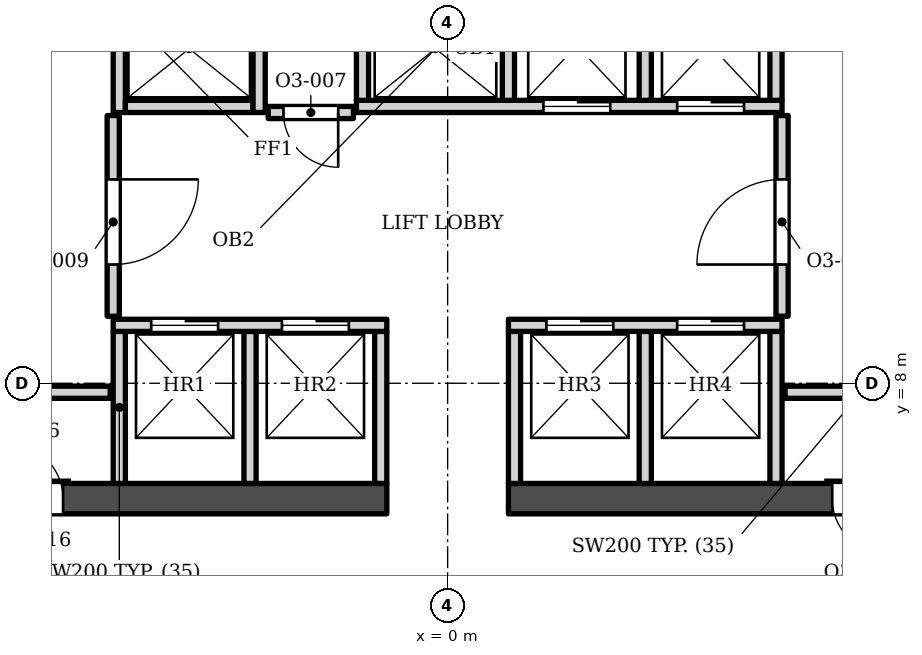
"""IFC4 building model, lengths in metres.
Left out: names, types, materials, properties, quantities, classifications, styles, units other than length and angle.
Written with IfcOpenShell. Run it as: python <this file> out.ifc"""

import sys

from ifc_helpers import new_model, si_unit, direction, frame, frame_2d, origin, place, context, subcontext, project, spatial, rectangle, extrude, element, fill, save


model = new_model("IFC4")
c1 = context("Model", 3, precision=1e-05, world=origin(), true_north=direction((0.0, 1.0)))
c2 = subcontext(c1, "Body", "Model", "MODEL_VIEW")
j1 = project(units=[si_unit("LENGTHUNIT", "METRE"), si_unit("PLANEANGLEUNIT", "RADIAN")], contexts=[c1])
p1 = place(None, origin())
s1 = spatial("IfcSite", under=j1, at=p1, CompositionType="ELEMENT")
p2 = place(p1, origin())
s2 = spatial("IfcBuilding", under=s1, at=p2, CompositionType="ELEMENT")
p3 = place(p2, frame((0.0, 0.0, 168.0)))
s3 = spatial("IfcBuildingStorey", under=s2, at=p3, CompositionType="ELEMENT", Elevation=168.0)
p4 = place(p3, frame((-8.05, 6.103, 0.0), z_axis=(0.0, 0.0, 1.0), x_axis=(1.0, 0.0, 0.0)))
e1 = element("IfcWall", 1, at=p4, inside=s3, PredefinedType="SHEAR", context=c2, shape_type="SweptSolid", body=[
    extrude(rectangle(XDim=7.05, YDim=0.5, at=frame_2d((3.525, 0.0))), origin(), (0.0, 0.0, 1.0), 3.9),
])
p5 = place(p4, frame((0.825, 0.0, 0.0)))
e2 = element("IfcOpeningElement", 2, at=p5, cuts=e1, PredefinedType="OPENING", context=c2, shape_type="SweptSolid", body=[
    extrude(rectangle(XDim=0.9, YDim=2.1, at=frame_2d((0.45, 1.05))), frame((0.0, 0.26, 0.0), z_axis=(0.0, -1.0, 0.0), x_axis=(1.0, 0.0, 0.0)), (0.0, 0.0, 1.0), 0.52),
])
p6 = place(p3, frame((1.0, 6.103, 0.0), z_axis=(0.0, 0.0, 1.0), x_axis=(1.0, 0.0, 0.0)))
e3 = element("IfcWall", 3, at=p6, inside=s3, PredefinedType="SHEAR", context=c2, shape_type="SweptSolid", body=[
    extrude(rectangle(XDim=7.05, YDim=0.5, at=frame_2d((3.525, 0.0))), origin(), (0.0, 0.0, 1.0), 3.9),
])
p7 = place(p6, frame((5.325, 0.0, 0.0)))
e4 = element("IfcOpeningElement", 4, at=p7, cuts=e3, PredefinedType="OPENING", context=c2, shape_type="SweptSolid", body=[
    extrude(rectangle(XDim=0.9, YDim=2.1, at=frame_2d((0.45, 1.05))), frame((0.0, 0.26, 0.0), z_axis=(0.0, -1.0, 0.0), x_axis=(1.0, 0.0, 0.0)), (0.0, 0.0, 1.0), 0.52),
])
for number, where, z_axis, x_axis in (
    (5, (-5.4, 6.353, 0.0), (0.0, 0.0, 1.0), (0.0, 1.0, 0.0)),
    (6, (-3.25, 6.353, 0.0), (0.0, 0.0, 1.0), (0.0, 1.0, 0.0)),
    (7, (-1.1, 6.353, 0.0), (0.0, 0.0, 1.0), (0.0, 1.0, 0.0)),
    (8, (1.1, 6.353, 0.0), (0.0, 0.0, 1.0), (0.0, 1.0, 0.0)),
    (9, (3.25, 6.353, 0.0), (0.0, 0.0, 1.0), (0.0, 1.0, 0.0)),
    (10, (5.4, 6.353, 0.0), (0.0, 0.0, 1.0), (0.0, 1.0, 0.0)),
    (11, (-8.05, 7.853, 0.0), (0.0, 0.0, 1.0), (1.0, 0.0, 0.0)),
    (12, (5.55, 7.853, 0.0), (0.0, 0.0, 1.0), (1.0, 0.0, 0.0)),
):
    element("IfcWall", number, at=place(p3, frame(where, z_axis=z_axis, x_axis=x_axis)), inside=s3, PredefinedType="SOLIDWALL", context=c2, shape_type="SweptSolid", body=[
        extrude(rectangle(XDim=2.5, YDim=0.2, at=frame_2d((1.25, 0.0))), origin(), (0.0, 0.0, 1.0), 3.73),
    ])
p8 = place(p3, frame((-5.5, 8.953, 0.0), z_axis=(0.0, 0.0, 1.0), x_axis=(1.0, 0.0, 0.0)))
e13 = element("IfcWall", 13, at=p8, inside=s3, PredefinedType="SOLIDWALL", context=c2, shape_type="SweptSolid", body=[
    extrude(rectangle(XDim=4.5, YDim=0.2, at=frame_2d((2.25, 0.0))), origin(), (0.0, 0.0, 1.0), 3.73),
])
p9 = place(p8, frame((0.625, 0.0, 0.0)))
e14 = element("IfcOpeningElement", 14, at=p9, cuts=e13, PredefinedType="OPENING", context=c2, shape_type="SweptSolid", body=[
    extrude(rectangle(XDim=1.1, YDim=2.1, at=frame_2d((0.55, 1.05))), frame((0.0, 0.11, 0.0), z_axis=(0.0, -1.0, 0.0), x_axis=(1.0, 0.0, 0.0)), (0.0, 0.0, 1.0), 0.22),
])
p10 = place(p8, frame((2.775, 0.0, 0.0)))
e15 = element("IfcOpeningElement", 15, at=p10, cuts=e13, PredefinedType="OPENING", context=c2, shape_type="SweptSolid", body=[
    extrude(rectangle(XDim=1.1, YDim=2.1, at=frame_2d((0.55, 1.05))), frame((0.0, 0.11, 0.0), z_axis=(0.0, -1.0, 0.0), x_axis=(1.0, 0.0, 0.0)), (0.0, 0.0, 1.0), 0.22),
])
p11 = place(p3, frame((1.0, 8.953, 0.0), z_axis=(0.0, 0.0, 1.0), x_axis=(1.0, 0.0, 0.0)))
e16 = element("IfcWall", 16, at=p11, inside=s3, PredefinedType="SOLIDWALL", context=c2, shape_type="SweptSolid", body=[
    extrude(rectangle(XDim=4.5, YDim=0.2, at=frame_2d((2.25, 0.0))), origin(), (0.0, 0.0, 1.0), 3.73),
])
p12 = place(p11, frame((0.625, 0.0, 0.0)))
e17 = element("IfcOpeningElement", 17, at=p12, cuts=e16, PredefinedType="OPENING", context=c2, shape_type="SweptSolid", body=[
    extrude(rectangle(XDim=1.1, YDim=2.1, at=frame_2d((0.55, 1.05))), frame((0.0, 0.11, 0.0), z_axis=(0.0, -1.0, 0.0), x_axis=(1.0, 0.0, 0.0)), (0.0, 0.0, 1.0), 0.22),
])
p13 = place(p11, frame((2.775, 0.0, 0.0)))
e18 = element("IfcOpeningElement", 18, at=p13, cuts=e16, PredefinedType="OPENING", context=c2, shape_type="SweptSolid", body=[
    extrude(rectangle(XDim=1.1, YDim=2.1, at=frame_2d((0.55, 1.05))), frame((0.0, 0.11, 0.0), z_axis=(0.0, -1.0, 0.0), x_axis=(1.0, 0.0, 0.0)), (0.0, 0.0, 1.0), 0.22),
])
p14 = place(p3, frame((-5.5, 9.103, 0.0), z_axis=(0.0, 0.0, 1.0), x_axis=(0.0, 1.0, 0.0)))
e19 = element("IfcWall", 19, at=p14, inside=s3, PredefinedType="SOLIDWALL", context=c2, shape_type="SweptSolid", body=[
    extrude(rectangle(XDim=3.3, YDim=0.2, at=frame_2d((1.65, 0.0))), origin(), (0.0, 0.0, 1.0), 3.73),
])
p15 = place(p14, frame((0.85, 0.0, 0.0)))
e20 = element("IfcOpeningElement", 20, at=p15, cuts=e19, PredefinedType="OPENING", context=c2, shape_type="SweptSolid", body=[
    extrude(rectangle(XDim=1.4, YDim=2.1, at=frame_2d((0.7, 1.05))), frame((0.0, 0.11, 0.0), z_axis=(0.0, -1.0, 0.0), x_axis=(1.0, 0.0, 0.0)), (0.0, 0.0, 1.0), 0.22),
])
p16 = place(p3, frame((5.5, 9.103, 0.0), z_axis=(0.0, 0.0, 1.0), x_axis=(0.0, 1.0, 0.0)))
e21 = element("IfcWall", 21, at=p16, inside=s3, PredefinedType="SOLIDWALL", context=c2, shape_type="SweptSolid", body=[
    extrude(rectangle(XDim=3.3, YDim=0.2, at=frame_2d((1.65, 0.0))), origin(), (0.0, 0.0, 1.0), 3.73),
])
p17 = place(p16, frame((0.85, 0.0, 0.0)))
e22 = element("IfcOpeningElement", 22, at=p17, cuts=e21, PredefinedType="OPENING", context=c2, shape_type="SweptSolid", body=[
    extrude(rectangle(XDim=1.4, YDim=2.1, at=frame_2d((0.7, 1.05))), frame((0.0, 0.11, 0.0), z_axis=(0.0, -1.0, 0.0), x_axis=(1.0, 0.0, 0.0)), (0.0, 0.0, 1.0), 0.22),
])
p18 = place(p3, frame((-2.95, 12.453, 0.0), z_axis=(0.0, 0.0, 1.0), x_axis=(1.0, 0.0, 0.0)))
e23 = element("IfcWall", 23, at=p18, inside=s3, PredefinedType="SOLIDWALL", context=c2, shape_type="SweptSolid", body=[
    extrude(rectangle(XDim=1.4, YDim=0.2, at=frame_2d((0.7, 0.0))), origin(), (0.0, 0.0, 1.0), 3.73),
])
p19 = place(p18, frame((0.25, 0.0, 0.0)))
e24 = element("IfcOpeningElement", 24, at=p19, cuts=e23, PredefinedType="OPENING", context=c2, shape_type="SweptSolid", body=[
    extrude(rectangle(XDim=0.9, YDim=2.1, at=frame_2d((0.45, 1.05))), frame((0.0, 0.11, 0.0), z_axis=(0.0, -1.0, 0.0), x_axis=(1.0, 0.0, 0.0)), (0.0, 0.0, 1.0), 0.22),
])
p20 = place(p3, frame((-5.4, 12.453, 0.0), z_axis=(0.0, 0.0, 1.0), x_axis=(0.0, 1.0, 0.0)))
e25 = element("IfcWall", 25, at=p20, inside=s3, PredefinedType="SOLIDWALL", context=c2, shape_type="SweptSolid", body=[
    extrude(rectangle(XDim=3.0, YDim=0.2, at=frame_2d((1.5, 0.0))), origin(), (0.0, 0.0, 1.0), 3.73),
])
p21 = place(p3, frame((-5.3, 12.552, 0.0), z_axis=(0.0, 0.0, 1.0), x_axis=(1.0, 0.0, 0.0)))
e26 = element("IfcWall", 26, at=p21, inside=s3, PredefinedType="SOLIDWALL", context=c2, shape_type="SweptSolid", body=[
    extrude(rectangle(XDim=2.1, YDim=0.2, at=frame_2d((1.05, 0.0))), origin(), (0.0, 0.0, 1.0), 3.73),
])
p22 = place(p3, frame((-3.1, 12.453, 0.0), z_axis=(0.0, 0.0, 1.0), x_axis=(0.0, 1.0, 0.0)))
e27 = element("IfcWall", 27, at=p22, inside=s3, PredefinedType="SOLIDWALL", context=c2, shape_type="SweptSolid", body=[
    extrude(rectangle(XDim=3.0, YDim=0.2, at=frame_2d((1.5, 0.0))), origin(), (0.0, 0.0, 1.0), 3.73),
])
p23 = place(p3, frame((-1.5, 12.552, 0.0), z_axis=(0.0, 0.0, 1.0), x_axis=(1.0, 0.0, 0.0)))
e28 = element("IfcWall", 28, at=p23, inside=s3, PredefinedType="SOLIDWALL", context=c2, shape_type="SweptSolid", body=[
    extrude(rectangle(XDim=7.0, YDim=0.2, at=frame_2d((3.5, 0.0))), origin(), (0.0, 0.0, 1.0), 3.73),
])
p24 = place(p23, frame((3.075, 0.0, 0.0)))
e29 = element("IfcOpeningElement", 29, at=p24, cuts=e28, PredefinedType="OPENING", context=c2, shape_type="SweptSolid", body=[
    extrude(rectangle(XDim=1.1, YDim=2.1, at=frame_2d((0.55, 1.05))), frame((0.0, 0.11, 0.0), z_axis=(0.0, -1.0, 0.0), x_axis=(1.0, 0.0, 0.0)), (0.0, 0.0, 1.0), 0.22),
])
p25 = place(p23, frame((5.275, 0.0, 0.0)))
e30 = element("IfcOpeningElement", 30, at=p25, cuts=e28, PredefinedType="OPENING", context=c2, shape_type="SweptSolid", body=[
    extrude(rectangle(XDim=1.1, YDim=2.1, at=frame_2d((0.55, 1.05))), frame((0.0, 0.11, 0.0), z_axis=(0.0, -1.0, 0.0), x_axis=(1.0, 0.0, 0.0)), (0.0, 0.0, 1.0), 0.22),
])
for number, where, z_axis, x_axis in (
    (31, (-1.4, 12.653, 0.0), (0.0, 0.0, 1.0), (0.0, 1.0, 0.0)),
    (32, (1.0, 12.653, 0.0), (0.0, 0.0, 1.0), (0.0, 1.0, 0.0)),
    (33, (3.25, 12.653, 0.0), (0.0, 0.0, 1.0), (0.0, 1.0, 0.0)),
):
    element("IfcWall", number, at=place(p3, frame(where, z_axis=z_axis, x_axis=x_axis)), inside=s3, PredefinedType="SOLIDWALL", context=c2, shape_type="SweptSolid", body=[
        extrude(rectangle(XDim=2.6, YDim=0.2, at=frame_2d((1.3, 0.0))), origin(), (0.0, 0.0, 1.0), 3.73),
    ])
p26 = place(p3, frame((5.4, 12.653, 0.0), z_axis=(0.0, 0.0, 1.0), x_axis=(0.0, 1.0, 0.0)))
e34 = element("IfcWall", 34, at=p26, inside=s3, PredefinedType="SOLIDWALL", context=c2, shape_type="SweptSolid", body=[
    extrude(rectangle(XDim=1.6, YDim=0.2, at=frame_2d((0.8, 0.0))), origin(), (0.0, 0.0, 1.0), 3.73),
])
p27 = place(p9, origin())
e35 = element("IfcDoor", 35, at=p27, inside=s3, OperationType="DOUBLE_DOOR_SLIDING", PredefinedType="DOOR", context=c2, shape_type="SweptSolid", body=[
    extrude(rectangle(XDim=1.1, YDim=2.1, at=frame_2d((0.55, 1.05))), frame((0.0, 0.025, 0.0), z_axis=(0.0, -1.0, 0.0), x_axis=(1.0, 0.0, 0.0)), (0.0, 0.0, 1.0), 0.05),
])
fill(e14, e35)
p28 = place(p10, origin())
e36 = element("IfcDoor", 36, at=p28, inside=s3, OperationType="DOUBLE_DOOR_SLIDING", PredefinedType="DOOR", context=c2, shape_type="SweptSolid", body=[
    extrude(rectangle(XDim=1.1, YDim=2.1, at=frame_2d((0.55, 1.05))), frame((0.0, 0.025, 0.0), z_axis=(0.0, -1.0, 0.0), x_axis=(1.0, 0.0, 0.0)), (0.0, 0.0, 1.0), 0.05),
])
fill(e15, e36)
p29 = place(p12, origin())
e37 = element("IfcDoor", 37, at=p29, inside=s3, OperationType="DOUBLE_DOOR_SLIDING", PredefinedType="DOOR", context=c2, shape_type="SweptSolid", body=[
    extrude(rectangle(XDim=1.1, YDim=2.1, at=frame_2d((0.55, 1.05))), frame((0.0, 0.025, 0.0), z_axis=(0.0, -1.0, 0.0), x_axis=(1.0, 0.0, 0.0)), (0.0, 0.0, 1.0), 0.05),
])
fill(e17, e37)
p30 = place(p13, origin())
e38 = element("IfcDoor", 38, at=p30, inside=s3, OperationType="DOUBLE_DOOR_SLIDING", PredefinedType="DOOR", context=c2, shape_type="SweptSolid", body=[
    extrude(rectangle(XDim=1.1, YDim=2.1, at=frame_2d((0.55, 1.05))), frame((0.0, 0.025, 0.0), z_axis=(0.0, -1.0, 0.0), x_axis=(1.0, 0.0, 0.0)), (0.0, 0.0, 1.0), 0.05),
])
fill(e18, e38)
p31 = place(p24, origin())
e39 = element("IfcDoor", 39, at=p31, inside=s3, OperationType="DOUBLE_DOOR_SLIDING", PredefinedType="DOOR", context=c2, shape_type="SweptSolid", body=[
    extrude(rectangle(XDim=1.1, YDim=2.1, at=frame_2d((0.55, 1.05))), frame((0.0, 0.025, 0.0), z_axis=(0.0, -1.0, 0.0), x_axis=(1.0, 0.0, 0.0)), (0.0, 0.0, 1.0), 0.05),
])
fill(e29, e39)
p32 = place(p25, origin())
e40 = element("IfcDoor", 40, at=p32, inside=s3, OperationType="DOUBLE_DOOR_SLIDING", PredefinedType="DOOR", context=c2, shape_type="SweptSolid", body=[
    extrude(rectangle(XDim=1.1, YDim=2.1, at=frame_2d((0.55, 1.05))), frame((0.0, 0.025, 0.0), z_axis=(0.0, -1.0, 0.0), x_axis=(1.0, 0.0, 0.0)), (0.0, 0.0, 1.0), 0.05),
])
fill(e30, e40)
p33 = place(p19, origin())
e41 = element("IfcDoor", 41, at=p33, inside=s3, OperationType="SINGLE_SWING_RIGHT", PredefinedType="DOOR", context=c2, shape_type="SweptSolid", body=[
    extrude(rectangle(XDim=0.9, YDim=2.1, at=frame_2d((0.45, 1.05))), frame((0.0, 0.025, 0.0), z_axis=(0.0, -1.0, 0.0), x_axis=(1.0, 0.0, 0.0)), (0.0, 0.0, 1.0), 0.05),
])
fill(e24, e41)
p34 = place(p15, origin())
e42 = element("IfcDoor", 42, at=p34, inside=s3, OperationType="SINGLE_SWING_RIGHT", PredefinedType="DOOR", context=c2, shape_type="SweptSolid", body=[
    extrude(rectangle(XDim=1.4, YDim=2.1, at=frame_2d((0.7, 1.05))), frame((0.0, 0.025, 0.0), z_axis=(0.0, -1.0, 0.0), x_axis=(1.0, 0.0, 0.0)), (0.0, 0.0, 1.0), 0.05),
])
fill(e20, e42)
p35 = place(p17, origin())
e43 = element("IfcDoor", 43, at=p35, inside=s3, OperationType="SINGLE_SWING_LEFT", PredefinedType="DOOR", context=c2, shape_type="SweptSolid", body=[
    extrude(rectangle(XDim=1.4, YDim=2.1, at=frame_2d((0.7, 1.05))), frame((0.0, 0.025, 0.0), z_axis=(0.0, -1.0, 0.0), x_axis=(1.0, 0.0, 0.0)), (0.0, 0.0, 1.0), 0.05),
])
fill(e22, e43)
p36 = place(p5, origin())
e44 = element("IfcDoor", 44, at=p36, inside=s3, OperationType="SINGLE_SWING_LEFT", PredefinedType="DOOR", context=c2, shape_type="SweptSolid", body=[
    extrude(rectangle(XDim=0.9, YDim=2.1, at=frame_2d((0.45, 1.05))), frame((0.0, 0.025, 0.0), z_axis=(0.0, -1.0, 0.0), x_axis=(1.0, 0.0, 0.0)), (0.0, 0.0, 1.0), 0.05),
])
fill(e2, e44)
p37 = place(p7, origin())
e45 = element("IfcDoor", 45, at=p37, inside=s3, OperationType="SINGLE_SWING_RIGHT", PredefinedType="DOOR", context=c2, shape_type="SweptSolid", body=[
    extrude(rectangle(XDim=0.9, YDim=2.1, at=frame_2d((0.45, 1.05))), frame((0.0, 0.025, 0.0), z_axis=(0.0, -1.0, 0.0), x_axis=(1.0, 0.0, 0.0)), (0.0, 0.0, 1.0), 0.05),
])
fill(e4, e45)
save(model, sys.argv[1])
